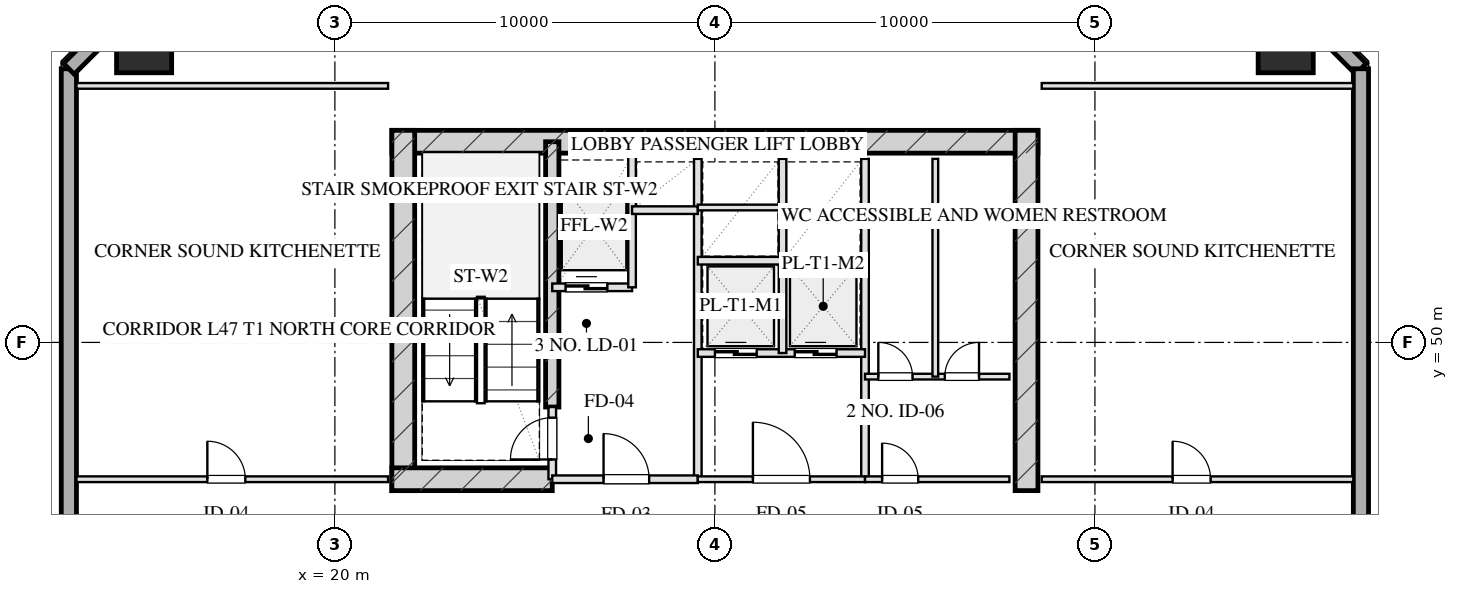
"""IFC4 building model, lengths in metres.
Left out: names, types, materials, properties, quantities, classifications, styles, units other than length and angle.
Written with IfcOpenShell. Run it as: python <this file> out.ifc"""

import sys

from ifc_helpers import new_model, si_unit, direction, frame, frame_2d, origin, origin_2d, place, context, subcontext, project, spatial, rectangle, hollow_rectangle, extrude, element, fill, save


model = new_model("IFC4")
c1 = context("Model", 3, precision=1e-05, world=origin(), true_north=direction((0.0, 1.0)))
c2 = subcontext(c1, "Body", "Model", "MODEL_VIEW")
j1 = project(units=[si_unit("LENGTHUNIT", "METRE"), si_unit("PLANEANGLEUNIT", "RADIAN")], contexts=[c1])
p1 = place(None, origin())
s1 = spatial("IfcSite", under=j1, at=p1, CompositionType="ELEMENT")
p2 = place(p1, origin())
s2 = spatial("IfcBuilding", under=s1, at=p2, CompositionType="ELEMENT")
p3 = place(p2, frame((0.0, 0.0, 177.1)))
s3 = spatial("IfcBuildingStorey", under=s2, at=p3, CompositionType="ELEMENT", Elevation=177.1)
p4 = place(p3, frame((21.5, 55.28, 0.0), z_axis=(0.0, 0.0, 1.0), x_axis=(1.0, 0.0, 0.0)))
e1 = element("IfcWall", 1, at=p4, inside=s3, PredefinedType="SHEAR", context=c2, shape_type="SweptSolid", body=[
    extrude(rectangle(XDim=17.0, YDim=0.6, at=frame_2d((8.5, 0.0))), origin(), (0.0, 0.0, 1.0), 3.45),
])
for number, where, z_axis, x_axis in (
    (2, (21.8, 46.1, 0.0), (0.0, 0.0, 1.0), (0.0, 1.0, 0.0)),
    (3, (38.2, 46.1, 0.0), (0.0, 0.0, 1.0), (0.0, 1.0, 0.0)),
):
    element("IfcWall", number, at=place(p3, frame(where, z_axis=z_axis, x_axis=x_axis)), inside=s3, PredefinedType="SHEAR", context=c2, shape_type="SweptSolid", body=[
        extrude(rectangle(XDim=9.48, YDim=0.6, at=frame_2d((4.74, 0.0))), origin(), (0.0, 0.0, 1.0), 3.45),
    ])
p5 = place(p3, frame((25.72, 48.3, 0.0), z_axis=(0.0, 0.0, 1.0), x_axis=(0.0, 1.0, 0.0)))
e4 = element("IfcWall", 4, at=p5, inside=s3, PredefinedType="SHEAR", context=c2, shape_type="SweptSolid", body=[
    extrude(rectangle(XDim=6.98, YDim=0.35, at=frame_2d((3.49, 0.0))), origin(), (0.0, 0.0, 1.0), 3.45),
])
p6 = place(p3, frame((21.5, 46.4, 0.0), z_axis=(0.0, 0.0, 1.0), x_axis=(1.0, 0.0, 0.0)))
e5 = element("IfcWall", 5, at=p6, inside=s3, PredefinedType="SHEAR", context=c2, shape_type="SweptSolid", body=[
    extrude(rectangle(XDim=4.22, YDim=0.6, at=frame_2d((2.11, 0.0))), origin(), (0.0, 0.0, 1.0), 3.45),
])
for number, where, z_axis, x_axis in (
    (6, (45.02, 57.82, 0.0), (0.0, 0.0, 1.0), (1.0, 0.0, 0.0)),
    (7, (14.98, 57.82, 0.0), (0.0, 0.0, 1.0), (1.0, 0.0, 0.0)),
):
    element("IfcColumn", number, at=place(p3, frame(where, z_axis=z_axis, x_axis=x_axis)), inside=s3, PredefinedType="COLUMN", context=c2, shape_type="SweptSolid", body=[
        extrude(hollow_rectangle(XDim=1.45, YDim=1.45, WallThickness=0.05, at=origin_2d()), origin(), (0.0, 0.0, 1.0), 3.451),
    ])
p7 = place(p3, frame((13.0, 10.8, 0.0), z_axis=(0.0, 0.0, 1.0), x_axis=(0.0, 1.0, 0.0)))
e8 = element("IfcWall", 8, at=p7, inside=s3, PredefinedType="SOLIDWALL", context=c2, shape_type="SweptSolid", body=[
    extrude(rectangle(XDim=46.4, YDim=0.4, at=frame_2d((23.2, 0.0))), origin(), (0.0, 0.0, 1.0), 2.61),
])
p8 = place(p7, frame((15.75, 0.0, 0.75)))
e9 = element("IfcOpeningElement", 9, at=p8, cuts=e8, PredefinedType="OPENING", context=c2, shape_type="SweptSolid", body=[
    extrude(rectangle(XDim=2.1, YDim=1.46, at=frame_2d((1.05, 0.73))), frame((0.0, 0.21, 0.0), z_axis=(0.0, -1.0, 0.0), x_axis=(1.0, 0.0, 0.0)), (0.0, 0.0, 1.0), 0.42),
])
p9 = place(p7, frame((19.55, 0.0, 0.75)))
e10 = element("IfcOpeningElement", 10, at=p9, cuts=e8, PredefinedType="OPENING", context=c2, shape_type="SweptSolid", body=[
    extrude(rectangle(XDim=2.1, YDim=1.46, at=frame_2d((1.05, 0.73))), frame((0.0, 0.21, 0.0), z_axis=(0.0, -1.0, 0.0), x_axis=(1.0, 0.0, 0.0)), (0.0, 0.0, 1.0), 0.42),
])
p10 = place(p7, frame((28.45, 0.0, 0.0)))
e11 = element("IfcOpeningElement", 11, at=p10, cuts=e8, PredefinedType="OPENING", context=c2, shape_type="SweptSolid", body=[
    extrude(rectangle(XDim=1.1, YDim=2.15, at=frame_2d((0.55, 1.075))), frame((0.0, 0.21, 0.0), z_axis=(0.0, -1.0, 0.0), x_axis=(1.0, 0.0, 0.0)), (0.0, 0.0, 1.0), 0.42),
])
for number, where, z_axis, x_axis in (
    (12, (13.0, 57.2, 0.0), (0.0, 0.0, 1.0), (0.707, 0.707, 0.0)),
    (13, (44.4, 59.8, 0.0), (0.0, 0.0, 1.0), (0.707, -0.707, 0.0)),
):
    element("IfcWall", number, at=place(p3, frame(where, z_axis=z_axis, x_axis=x_axis)), inside=s3, PredefinedType="SOLIDWALL", context=c2, shape_type="SweptSolid", body=[
        extrude(rectangle(XDim=3.677, YDim=0.4, at=frame_2d((1.838, 0.0))), origin(), (0.0, 0.0, 1.0), 2.61),
    ])
p11 = place(p3, frame((47.0, 57.2, 0.0), z_axis=(0.0, 0.0, 1.0), x_axis=(0.0, -1.0, 0.0)))
e14 = element("IfcWall", 14, at=p11, inside=s3, PredefinedType="SOLIDWALL", context=c2, shape_type="SweptSolid", body=[
    extrude(rectangle(XDim=46.4, YDim=0.4, at=frame_2d((23.2, 0.0))), origin(), (0.0, 0.0, 1.0), 2.61),
])
p12 = place(p11, frame((28.55, 0.0, 0.75)))
e15 = element("IfcOpeningElement", 15, at=p12, cuts=e14, PredefinedType="OPENING", context=c2, shape_type="SweptSolid", body=[
    extrude(rectangle(XDim=2.1, YDim=1.46, at=frame_2d((1.05, 0.73))), frame((0.0, 0.21, 0.0), z_axis=(0.0, -1.0, 0.0), x_axis=(1.0, 0.0, 0.0)), (0.0, 0.0, 1.0), 0.42),
])
p13 = place(p11, frame((24.75, 0.0, 0.75)))
e16 = element("IfcOpeningElement", 16, at=p13, cuts=e14, PredefinedType="OPENING", context=c2, shape_type="SweptSolid", body=[
    extrude(rectangle(XDim=2.1, YDim=1.46, at=frame_2d((1.05, 0.73))), frame((0.0, 0.21, 0.0), z_axis=(0.0, -1.0, 0.0), x_axis=(1.0, 0.0, 0.0)), (0.0, 0.0, 1.0), 0.42),
])
p14 = place(p11, frame((18.25, 0.0, 0.0)))
e17 = element("IfcOpeningElement", 17, at=p14, cuts=e14, PredefinedType="OPENING", context=c2, shape_type="SweptSolid", body=[
    extrude(rectangle(XDim=1.1, YDim=2.15, at=frame_2d((0.55, 1.075))), frame((0.0, 0.21, 0.0), z_axis=(0.0, -1.0, 0.0), x_axis=(1.0, 0.0, 0.0)), (0.0, 0.0, 1.0), 0.42),
])
p15 = place(p3, frame((25.72, 46.4, 0.0), z_axis=(0.0, 0.0, 1.0), x_axis=(0.0, 1.0, 0.0)))
e18 = element("IfcWall", 18, at=p15, inside=s3, PredefinedType="PARTITIONING", context=c2, shape_type="SweptSolid", body=[
    extrude(rectangle(XDim=1.9, YDim=0.2, at=frame_2d((0.95, 0.0))), origin(), (0.0, 0.0, 1.0), 3.175),
])
p16 = place(p15, frame((0.52, 0.0, 0.0)))
e19 = element("IfcOpeningElement", 19, at=p16, cuts=e18, PredefinedType="OPENING", context=c2, shape_type="SweptSolid", body=[
    extrude(rectangle(XDim=1.1, YDim=2.05, at=frame_2d((0.55, 1.025))), frame((0.0, 0.11, 0.0), z_axis=(0.0, -1.0, 0.0), x_axis=(1.0, 0.0, 0.0)), (0.0, 0.0, 1.0), 0.22),
])
p17 = place(p3, frame((29.55, 46.4, 0.0), z_axis=(0.0, 0.0, 1.0), x_axis=(0.0, 1.0, 0.0)))
e20 = element("IfcWall", 20, at=p17, inside=s3, PredefinedType="PARTITIONING", context=c2, shape_type="SweptSolid", body=[
    extrude(rectangle(XDim=8.43, YDim=0.2, at=frame_2d((4.215, 0.0))), origin(), (0.0, 0.0, 1.0), 3.175),
])
p18 = place(p3, frame((25.72, 46.4, 0.0), z_axis=(0.0, 0.0, 1.0), x_axis=(1.0, 0.0, 0.0)))
e21 = element("IfcWall", 21, at=p18, inside=s3, PredefinedType="PARTITIONING", context=c2, shape_type="SweptSolid", body=[
    extrude(rectangle(XDim=3.83, YDim=0.2, at=frame_2d((1.915, 0.0))), origin(), (0.0, 0.0, 1.0), 3.175),
])
p19 = place(p18, frame((1.35, 0.0, 0.0)))
e22 = element("IfcOpeningElement", 22, at=p19, cuts=e21, PredefinedType="OPENING", context=c2, shape_type="SweptSolid", body=[
    extrude(rectangle(XDim=1.2, YDim=2.05, at=frame_2d((0.6, 1.025))), frame((0.0, 0.11, 0.0), z_axis=(0.0, -1.0, 0.0), x_axis=(1.0, 0.0, 0.0)), (0.0, 0.0, 1.0), 0.22),
])
p20 = place(p3, frame((25.72, 51.45, 0.0), z_axis=(0.0, 0.0, 1.0), x_axis=(1.0, 0.0, 0.0)))
e23 = element("IfcWall", 23, at=p20, inside=s3, PredefinedType="PARTITIONING", context=c2, shape_type="SweptSolid", body=[
    extrude(rectangle(XDim=2.1, YDim=0.2, at=frame_2d((1.05, 0.0))), origin(), (0.0, 0.0, 1.0), 3.175),
])
p21 = place(p20, frame((0.35, 0.0, 0.0)))
e24 = element("IfcOpeningElement", 24, at=p21, cuts=e23, PredefinedType="OPENING", context=c2, shape_type="SweptSolid", body=[
    extrude(rectangle(XDim=1.1, YDim=2.05, at=frame_2d((0.55, 1.025))), frame((0.0, 0.11, 0.0), z_axis=(0.0, -1.0, 0.0), x_axis=(1.0, 0.0, 0.0)), (0.0, 0.0, 1.0), 0.22),
])
p22 = place(p3, frame((27.82, 51.45, 0.0), z_axis=(0.0, 0.0, 1.0), x_axis=(0.0, 1.0, 0.0)))
e25 = element("IfcWall", 25, at=p22, inside=s3, PredefinedType="PARTITIONING", context=c2, shape_type="SweptSolid", body=[
    extrude(rectangle(XDim=3.7, YDim=0.2, at=frame_2d((1.85, 0.0))), origin(), (0.0, 0.0, 1.0), 3.175),
])
p23 = place(p3, frame((27.82, 53.48, 0.0), z_axis=(0.0, 0.0, 1.0), x_axis=(1.0, 0.0, 0.0)))
e26 = element("IfcWall", 26, at=p23, inside=s3, PredefinedType="PARTITIONING", context=c2, shape_type="SweptSolid", body=[
    extrude(rectangle(XDim=1.73, YDim=0.2, at=frame_2d((0.865, 0.0))), origin(), (0.0, 0.0, 1.0), 3.175),
])
p24 = place(p3, frame((33.95, 46.4, 0.0), z_axis=(0.0, 0.0, 1.0), x_axis=(0.0, 1.0, 0.0)))
e27 = element("IfcWall", 27, at=p24, inside=s3, PredefinedType="PARTITIONING", context=c2, shape_type="SweptSolid", body=[
    extrude(rectangle(XDim=8.43, YDim=0.2, at=frame_2d((4.215, 0.0))), origin(), (0.0, 0.0, 1.0), 3.175),
])
p25 = place(p3, frame((29.55, 46.4, 0.0), z_axis=(0.0, 0.0, 1.0), x_axis=(1.0, 0.0, 0.0)))
e28 = element("IfcWall", 28, at=p25, inside=s3, PredefinedType="PARTITIONING", context=c2, shape_type="SweptSolid", body=[
    extrude(rectangle(XDim=4.4, YDim=0.15, at=frame_2d((2.2, 0.0))), origin(), (0.0, 0.0, 1.0), 3.175),
])
p26 = place(p25, frame((1.45, 0.0, 0.0)))
e29 = element("IfcOpeningElement", 29, at=p26, cuts=e28, PredefinedType="OPENING", context=c2, shape_type="SweptSolid", body=[
    extrude(rectangle(XDim=1.5, YDim=2.05, at=frame_2d((0.75, 1.025))), frame((0.0, 0.085, 0.0), z_axis=(0.0, -1.0, 0.0), x_axis=(1.0, 0.0, 0.0)), (0.0, 0.0, 1.0), 0.17),
])
p27 = place(p3, frame((29.55, 49.72, 0.0), z_axis=(0.0, 0.0, 1.0), x_axis=(1.0, 0.0, 0.0)))
e30 = element("IfcWall", 30, at=p27, inside=s3, PredefinedType="PARTITIONING", context=c2, shape_type="SweptSolid", body=[
    extrude(rectangle(XDim=4.4, YDim=0.2, at=frame_2d((2.2, 0.0))), origin(), (0.0, 0.0, 1.0), 3.175),
])
p28 = place(p27, frame((0.45, 0.0, 0.0)))
e31 = element("IfcOpeningElement", 31, at=p28, cuts=e30, PredefinedType="OPENING", context=c2, shape_type="SweptSolid", body=[
    extrude(rectangle(XDim=1.1, YDim=2.05, at=frame_2d((0.55, 1.025))), frame((0.0, 0.11, 0.0), z_axis=(0.0, -1.0, 0.0), x_axis=(1.0, 0.0, 0.0)), (0.0, 0.0, 1.0), 0.22),
])
p29 = place(p27, frame((2.55, 0.0, 0.0)))
e32 = element("IfcOpeningElement", 32, at=p29, cuts=e30, PredefinedType="OPENING", context=c2, shape_type="SweptSolid", body=[
    extrude(rectangle(XDim=1.1, YDim=2.05, at=frame_2d((0.55, 1.025))), frame((0.0, 0.11, 0.0), z_axis=(0.0, -1.0, 0.0), x_axis=(1.0, 0.0, 0.0)), (0.0, 0.0, 1.0), 0.22),
])
p30 = place(p3, frame((31.78, 49.72, 0.0), z_axis=(0.0, 0.0, 1.0), x_axis=(0.0, 1.0, 0.0)))
e33 = element("IfcWall", 33, at=p30, inside=s3, PredefinedType="PARTITIONING", context=c2, shape_type="SweptSolid", body=[
    extrude(rectangle(XDim=5.11, YDim=0.2, at=frame_2d((2.555, 0.0))), origin(), (0.0, 0.0, 1.0), 3.175),
])
p31 = place(p3, frame((29.55, 52.15, 0.0), z_axis=(0.0, 0.0, 1.0), x_axis=(1.0, 0.0, 0.0)))
e34 = element("IfcWall", 34, at=p31, inside=s3, PredefinedType="PARTITIONING", context=c2, shape_type="SweptSolid", body=[
    extrude(rectangle(XDim=4.4, YDim=0.2, at=frame_2d((2.2, 0.0))), origin(), (0.0, 0.0, 1.0), 3.175),
])
p32 = place(p3, frame((29.55, 53.55, 0.0), z_axis=(0.0, 0.0, 1.0), x_axis=(1.0, 0.0, 0.0)))
e35 = element("IfcWall", 35, at=p32, inside=s3, PredefinedType="PARTITIONING", context=c2, shape_type="SweptSolid", body=[
    extrude(rectangle(XDim=2.23, YDim=0.15, at=frame_2d((1.115, 0.0))), origin(), (0.0, 0.0, 1.0), 3.175),
])
p33 = place(p3, frame((33.95, 46.4, 0.0), z_axis=(0.0, 0.0, 1.0), x_axis=(1.0, 0.0, 0.0)))
e36 = element("IfcWall", 36, at=p33, inside=s3, PredefinedType="PARTITIONING", context=c2, shape_type="SweptSolid", body=[
    extrude(rectangle(XDim=3.8, YDim=0.15, at=frame_2d((1.9, 0.0))), origin(), (0.0, 0.0, 1.0), 3.175),
])
p34 = place(p33, frame((0.45, 0.0, 0.0)))
e37 = element("IfcOpeningElement", 37, at=p34, cuts=e36, PredefinedType="OPENING", context=c2, shape_type="SweptSolid", body=[
    extrude(rectangle(XDim=0.95, YDim=2.05, at=frame_2d((0.475, 1.025))), frame((0.0, 0.085, 0.0), z_axis=(0.0, -1.0, 0.0), x_axis=(1.0, 0.0, 0.0)), (0.0, 0.0, 1.0), 0.17),
])
p35 = place(p3, frame((33.95, 49.1, 0.0), z_axis=(0.0, 0.0, 1.0), x_axis=(1.0, 0.0, 0.0)))
e38 = element("IfcWall", 38, at=p35, inside=s3, PredefinedType="PARTITIONING", context=c2, shape_type="SweptSolid", body=[
    extrude(rectangle(XDim=3.8, YDim=0.15, at=frame_2d((1.9, 0.0))), origin(), (0.0, 0.0, 1.0), 3.175),
])
p36 = place(p35, frame((0.35, 0.0, 0.0)))
e39 = element("IfcOpeningElement", 39, at=p36, cuts=e38, PredefinedType="OPENING", context=c2, shape_type="SweptSolid", body=[
    extrude(rectangle(XDim=0.9, YDim=2.05, at=frame_2d((0.45, 1.025))), frame((0.0, 0.085, 0.0), z_axis=(0.0, -1.0, 0.0), x_axis=(1.0, 0.0, 0.0)), (0.0, 0.0, 1.0), 0.17),
])
p37 = place(p35, frame((2.1, 0.0, 0.0)))
e40 = element("IfcOpeningElement", 40, at=p37, cuts=e38, PredefinedType="OPENING", context=c2, shape_type="SweptSolid", body=[
    extrude(rectangle(XDim=0.9, YDim=2.05, at=frame_2d((0.45, 1.025))), frame((0.0, 0.085, 0.0), z_axis=(0.0, -1.0, 0.0), x_axis=(1.0, 0.0, 0.0)), (0.0, 0.0, 1.0), 0.17),
])
p38 = place(p3, frame((35.8, 49.1, 0.0), z_axis=(0.0, 0.0, 1.0), x_axis=(0.0, 1.0, 0.0)))
e41 = element("IfcWall", 41, at=p38, inside=s3, PredefinedType="PARTITIONING", context=c2, shape_type="SweptSolid", body=[
    extrude(rectangle(XDim=5.73, YDim=0.15, at=frame_2d((2.865, 0.0))), origin(), (0.0, 0.0, 1.0), 3.175),
])
p39 = place(p3, frame((13.2, 56.75, 0.0), z_axis=(0.0, 0.0, 1.0), x_axis=(1.0, 0.0, 0.0)))
e42 = element("IfcWall", 42, at=p39, inside=s3, PredefinedType="PARTITIONING", context=c2, shape_type="SweptSolid", body=[
    extrude(rectangle(XDim=8.2, YDim=0.15, at=frame_2d((4.1, 0.0))), origin(), (0.0, 0.0, 1.0), 3.175),
])
p40 = place(p3, frame((13.2, 46.4, 0.0), z_axis=(0.0, 0.0, 1.0), x_axis=(1.0, 0.0, 0.0)))
e43 = element("IfcWall", 43, at=p40, inside=s3, PredefinedType="PARTITIONING", context=c2, shape_type="SweptSolid", body=[
    extrude(rectangle(XDim=8.2, YDim=0.15, at=frame_2d((4.1, 0.0))), origin(), (0.0, 0.0, 1.0), 3.175),
])
p41 = place(p40, frame((3.444, 0.0, 0.0)))
e44 = element("IfcOpeningElement", 44, at=p41, cuts=e43, PredefinedType="OPENING", context=c2, shape_type="SweptSolid", body=[
    extrude(rectangle(XDim=1.0, YDim=2.05, at=frame_2d((0.5, 1.025))), frame((0.0, 0.085, 0.0), z_axis=(0.0, -1.0, 0.0), x_axis=(1.0, 0.0, 0.0)), (0.0, 0.0, 1.0), 0.17),
])
p42 = place(p3, frame((38.6, 56.75, 0.0), z_axis=(0.0, 0.0, 1.0), x_axis=(1.0, 0.0, 0.0)))
e45 = element("IfcWall", 45, at=p42, inside=s3, PredefinedType="PARTITIONING", context=c2, shape_type="SweptSolid", body=[
    extrude(rectangle(XDim=8.2, YDim=0.15, at=frame_2d((4.1, 0.0))), origin(), (0.0, 0.0, 1.0), 3.175),
])
p43 = place(p3, frame((38.6, 46.4, 0.0), z_axis=(0.0, 0.0, 1.0), x_axis=(1.0, 0.0, 0.0)))
e46 = element("IfcWall", 46, at=p43, inside=s3, PredefinedType="PARTITIONING", context=c2, shape_type="SweptSolid", body=[
    extrude(rectangle(XDim=8.2, YDim=0.15, at=frame_2d((4.1, 0.0))), origin(), (0.0, 0.0, 1.0), 3.175),
])
p44 = place(p43, frame((3.444, 0.0, 0.0)))
e47 = element("IfcOpeningElement", 47, at=p44, cuts=e46, PredefinedType="OPENING", context=c2, shape_type="SweptSolid", body=[
    extrude(rectangle(XDim=1.0, YDim=2.05, at=frame_2d((0.5, 1.025))), frame((0.0, 0.085, 0.0), z_axis=(0.0, -1.0, 0.0), x_axis=(1.0, 0.0, 0.0)), (0.0, 0.0, 1.0), 0.17),
])
p45 = place(p16, origin())
e48 = element("IfcDoor", 48, at=p45, inside=s3, OperationType="SINGLE_SWING_LEFT", PredefinedType="DOOR", context=c2, shape_type="SweptSolid", body=[
    extrude(rectangle(XDim=1.1, YDim=2.05, at=frame_2d((0.55, 1.025))), frame((0.0, 0.025, 0.0), z_axis=(0.0, -1.0, 0.0), x_axis=(1.0, 0.0, 0.0)), (0.0, 0.0, 1.0), 0.05),
])
fill(e19, e48)
p46 = place(p19, origin())
e49 = element("IfcDoor", 49, at=p46, inside=s3, OperationType="SINGLE_SWING_LEFT", PredefinedType="DOOR", context=c2, shape_type="SweptSolid", body=[
    extrude(rectangle(XDim=1.2, YDim=2.05, at=frame_2d((0.6, 1.025))), frame((0.0, 0.025, 0.0), z_axis=(0.0, -1.0, 0.0), x_axis=(1.0, 0.0, 0.0)), (0.0, 0.0, 1.0), 0.05),
])
fill(e22, e49)
p47 = place(p21, origin())
e50 = element("IfcDoor", 50, at=p47, inside=s3, OperationType="DOUBLE_DOOR_SLIDING", PredefinedType="DOOR", context=c2, shape_type="SweptSolid", body=[
    extrude(rectangle(XDim=1.1, YDim=2.05, at=frame_2d((0.55, 1.025))), frame((0.0, 0.025, 0.0), z_axis=(0.0, -1.0, 0.0), x_axis=(1.0, 0.0, 0.0)), (0.0, 0.0, 1.0), 0.05),
])
fill(e24, e50)
p48 = place(p26, origin())
e51 = element("IfcDoor", 51, at=p48, inside=s3, OperationType="SINGLE_SWING_LEFT", PredefinedType="DOOR", context=c2, shape_type="SweptSolid", body=[
    extrude(rectangle(XDim=1.5, YDim=2.05, at=frame_2d((0.75, 1.025))), frame((0.0, 0.025, 0.0), z_axis=(0.0, -1.0, 0.0), x_axis=(1.0, 0.0, 0.0)), (0.0, 0.0, 1.0), 0.05),
])
fill(e29, e51)
p49 = place(p28, origin())
e52 = element("IfcDoor", 52, at=p49, inside=s3, OperationType="DOUBLE_DOOR_SLIDING", PredefinedType="DOOR", context=c2, shape_type="SweptSolid", body=[
    extrude(rectangle(XDim=1.1, YDim=2.05, at=frame_2d((0.55, 1.025))), frame((0.0, 0.025, 0.0), z_axis=(0.0, -1.0, 0.0), x_axis=(1.0, 0.0, 0.0)), (0.0, 0.0, 1.0), 0.05),
])
fill(e31, e52)
p50 = place(p29, origin())
e53 = element("IfcDoor", 53, at=p50, inside=s3, OperationType="DOUBLE_DOOR_SLIDING", PredefinedType="DOOR", context=c2, shape_type="SweptSolid", body=[
    extrude(rectangle(XDim=1.1, YDim=2.05, at=frame_2d((0.55, 1.025))), frame((0.0, 0.025, 0.0), z_axis=(0.0, -1.0, 0.0), x_axis=(1.0, 0.0, 0.0)), (0.0, 0.0, 1.0), 0.05),
])
fill(e32, e53)
p51 = place(p34, origin())
e54 = element("IfcDoor", 54, at=p51, inside=s3, OperationType="SINGLE_SWING_LEFT", PredefinedType="DOOR", context=c2, shape_type="SweptSolid", body=[
    extrude(rectangle(XDim=0.95, YDim=2.05, at=frame_2d((0.475, 1.025))), frame((0.0, 0.025, 0.0), z_axis=(0.0, -1.0, 0.0), x_axis=(1.0, 0.0, 0.0)), (0.0, 0.0, 1.0), 0.05),
])
fill(e37, e54)
p52 = place(p36, origin())
e55 = element("IfcDoor", 55, at=p52, inside=s3, OperationType="SINGLE_SWING_LEFT", PredefinedType="DOOR", context=c2, shape_type="SweptSolid", body=[
    extrude(rectangle(XDim=0.9, YDim=2.05, at=frame_2d((0.45, 1.025))), frame((0.0, 0.025, 0.0), z_axis=(0.0, -1.0, 0.0), x_axis=(1.0, 0.0, 0.0)), (0.0, 0.0, 1.0), 0.05),
])
fill(e39, e55)
p53 = place(p37, origin())
e56 = element("IfcDoor", 56, at=p53, inside=s3, OperationType="SINGLE_SWING_RIGHT", PredefinedType="DOOR", context=c2, shape_type="SweptSolid", body=[
    extrude(rectangle(XDim=0.9, YDim=2.05, at=frame_2d((0.45, 1.025))), frame((0.0, 0.025, 0.0), z_axis=(0.0, -1.0, 0.0), x_axis=(1.0, 0.0, 0.0)), (0.0, 0.0, 1.0), 0.05),
])
fill(e40, e56)
p54 = place(p41, origin())
e57 = element("IfcDoor", 57, at=p54, inside=s3, OperationType="SINGLE_SWING_LEFT", PredefinedType="DOOR", context=c2, shape_type="SweptSolid", body=[
    extrude(rectangle(XDim=1.0, YDim=2.05, at=frame_2d((0.5, 1.025))), frame((0.0, 0.025, 0.0), z_axis=(0.0, -1.0, 0.0), x_axis=(1.0, 0.0, 0.0)), (0.0, 0.0, 1.0), 0.05),
])
fill(e44, e57)
p55 = place(p44, origin())
e58 = element("IfcDoor", 58, at=p55, inside=s3, OperationType="SINGLE_SWING_LEFT", PredefinedType="DOOR", context=c2, shape_type="SweptSolid", body=[
    extrude(rectangle(XDim=1.0, YDim=2.05, at=frame_2d((0.5, 1.025))), frame((0.0, 0.025, 0.0), z_axis=(0.0, -1.0, 0.0), x_axis=(1.0, 0.0, 0.0)), (0.0, 0.0, 1.0), 0.05),
])
fill(e47, e58)
save(model, sys.argv[1])
